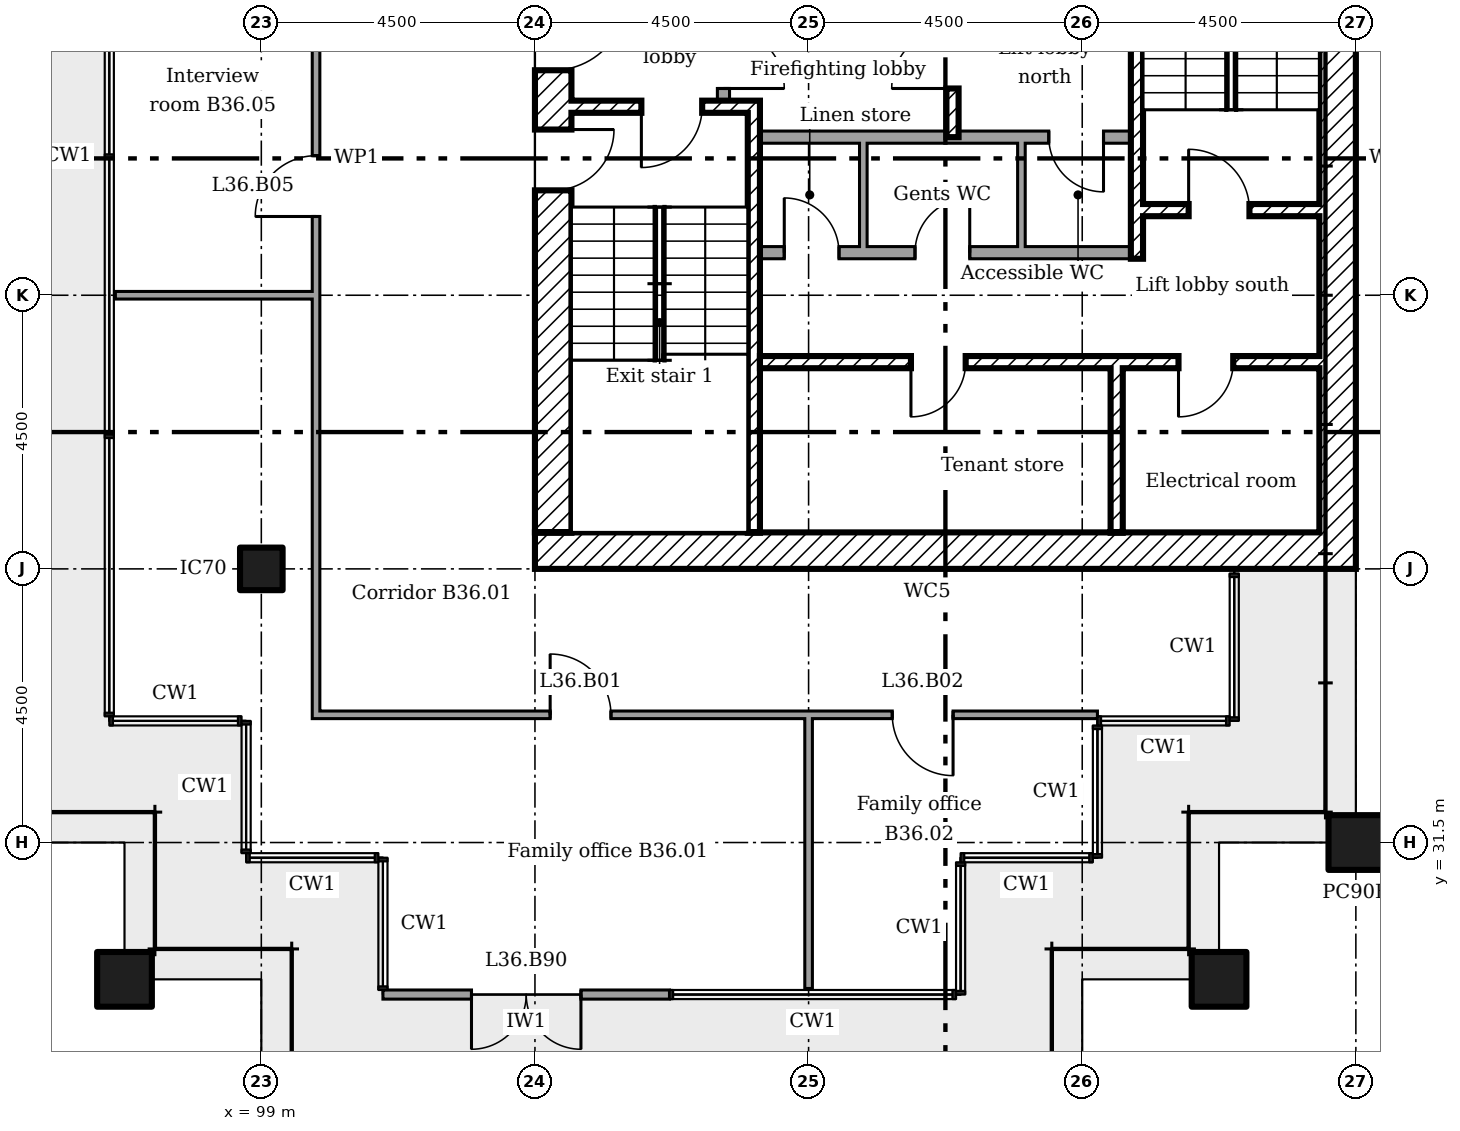
"""IFC4 building model, lengths in metres.
Left out: names, types, materials, properties, quantities, classifications, styles, units other than length and angle.
Written with IfcOpenShell. Run it as: python <this file> out.ifc"""

import sys

from ifc_helpers import new_model, si_unit, direction, frame, frame_2d, origin, origin_2d, place, context, subcontext, project, spatial, rectangle, extrude, element, fill, save


model = new_model("IFC4")
c1 = context("Model", 3, precision=1e-05, world=origin(), true_north=direction((0.0, 1.0)))
c2 = subcontext(c1, "Body", "Model", "MODEL_VIEW")
j1 = project(units=[si_unit("LENGTHUNIT", "METRE"), si_unit("PLANEANGLEUNIT", "RADIAN")], contexts=[c1])
p1 = place(None, origin())
s1 = spatial("IfcSite", under=j1, at=p1, CompositionType="ELEMENT")
p2 = place(p1, origin())
s2 = spatial("IfcBuilding", under=s1, at=p2, CompositionType="ELEMENT")
p3 = place(p2, frame((0.0, 0.0, 147.4)))
s3 = spatial("IfcBuildingStorey", under=s2, at=p3, CompositionType="ELEMENT", Elevation=147.4)
for number, where in (
    (1, (114.75, 29.25, 0.0)),
    (2, (117.0, 31.5, 0.0)),
    (3, (96.75, 29.25, 0.0)),
):
    element("IfcColumn", number, at=place(p3, frame(where)), inside=s3, PredefinedType="COLUMN", context=c2, shape_type="SweptSolid", body=[
        extrude(rectangle(XDim=0.9, YDim=0.9, at=origin_2d()), origin(), (0.0, 0.0, 1.0), 3.6),
    ])
p4 = place(p3, frame((99.0, 36.0, 0.0)))
e4 = element("IfcColumn", 4, at=p4, inside=s3, PredefinedType="COLUMN", context=c2, shape_type="SweptSolid", body=[
    extrude(rectangle(XDim=0.7, YDim=0.7, at=origin_2d()), origin(), (0.0, 0.0, 1.0), 3.6),
])
p5 = place(p3, frame((101.0, 29.0, 0.0)))
e5 = element("IfcWall", 5, at=p5, inside=s3, PredefinedType="SOLIDWALL", context=c2, shape_type="SweptSolid", body=[
    extrude(rectangle(XDim=4.712, YDim=0.15, at=frame_2d((2.356, 0.0))), origin(), (0.0, 0.0, 1.0), 3.45),
])
p6 = place(p5, frame((1.456, 0.0, 0.0)))
e6 = element("IfcOpeningElement", 6, at=p6, cuts=e5, PredefinedType="OPENING", context=c2, shape_type="SweptSolid", body=[
    extrude(rectangle(XDim=1.8, YDim=2.4, at=frame_2d((0.9, 1.2))), frame((0.0, 0.085, 0.0), z_axis=(0.0, -1.0, 0.0), x_axis=(1.0, 0.0, 0.0)), (0.0, 0.0, 1.0), 0.17),
])
p7 = place(p3, frame((116.7, 36.0, 0.0), z_axis=(0.0, 0.0, 1.0), x_axis=(0.0, 1.0, 0.0)))
e7 = element("IfcWall", 7, at=p7, inside=s3, PredefinedType="SHEAR", context=c2, shape_type="SweptSolid", body=[
    extrude(rectangle(XDim=13.5, YDim=0.6, at=frame_2d((6.75, 0.0))), origin(), (0.0, 0.0, 1.0), 3.35),
])
p8 = place(p3, frame((103.5, 36.3, 0.0)))
e8 = element("IfcWall", 8, at=p8, inside=s3, PredefinedType="SHEAR", context=c2, shape_type="SweptSolid", body=[
    extrude(rectangle(XDim=12.9, YDim=0.6, at=frame_2d((6.45, 0.0))), origin(), (0.0, 0.0, 1.0), 3.35),
])
p9 = place(p3, frame((103.8, 36.6, 0.0), z_axis=(0.0, 0.0, 1.0), x_axis=(0.0, 1.0, 0.0)))
e9 = element("IfcWall", 9, at=p9, inside=s3, PredefinedType="SHEAR", context=c2, shape_type="SweptSolid", body=[
    extrude(rectangle(XDim=12.3, YDim=0.6, at=frame_2d((6.15, 0.0))), origin(), (0.0, 0.0, 1.0), 3.35),
])
p10 = place(p9, frame((7.6, 0.0, 0.0)))
e10 = element("IfcOpeningElement", 10, at=p10, cuts=e9, PredefinedType="OPENING", context=c2, shape_type="SweptSolid", body=[
    extrude(rectangle(XDim=1.2, YDim=2.1, at=frame_2d((0.6, 1.05))), frame((0.0, 0.31, 0.0), z_axis=(0.0, -1.0, 0.0), x_axis=(1.0, 0.0, 0.0)), (0.0, 0.0, 1.0), 0.62),
])
p11 = place(p9, frame((5.625, 0.0, 0.0)))
e11 = element("IfcOpeningElement", 11, at=p11, cuts=e9, PredefinedType="OPENING", context=c2, shape_type="SweptSolid", body=[
    extrude(rectangle(XDim=1.0, YDim=2.1, at=frame_2d((0.5, 1.05))), frame((0.0, 0.31, 0.0), z_axis=(0.0, -1.0, 0.0), x_axis=(1.0, 0.0, 0.0)), (0.0, 0.0, 1.0), 0.62),
])
p12 = place(p3, frame((110.367, 48.9, 0.0), z_axis=(0.0, 0.0, 1.0), x_axis=(0.0, -1.0, 0.0)))
e12 = element("IfcWall", 12, at=p12, inside=s3, PredefinedType="SHEAR", context=c2, shape_type="SweptSolid", body=[
    extrude(rectangle(XDim=5.8, YDim=0.2, at=frame_2d((2.9, 0.0))), origin(), (0.0, 0.0, 1.0), 3.35),
])
p13 = place(p12, frame((4.0, 0.0, 0.0)))
e13 = element("IfcOpeningElement", 13, at=p13, cuts=e12, PredefinedType="OPENING", context=c2, shape_type="SweptSolid", body=[
    extrude(rectangle(XDim=1.0, YDim=2.1, at=frame_2d((0.5, 1.05))), frame((0.0, 0.11, 0.0), z_axis=(0.0, -1.0, 0.0), x_axis=(1.0, 0.0, 0.0)), (0.0, 0.0, 1.0), 0.22),
])
p14 = place(p3, frame((113.067, 36.6, 0.0), z_axis=(0.0, 0.0, 1.0), x_axis=(0.0, 1.0, 0.0)))
e14 = element("IfcWall", 14, at=p14, inside=s3, PredefinedType="SHEAR", context=c2, shape_type="SweptSolid", body=[
    extrude(rectangle(XDim=2.7, YDim=0.2, at=frame_2d((1.35, 0.0))), origin(), (0.0, 0.0, 1.0), 3.35),
])
p15 = place(p3, frame((106.6, 43.7, 0.0), z_axis=(0.0, 0.0, 1.0), x_axis=(0.0, 1.0, 0.0)))
e15 = element("IfcWall", 15, at=p15, inside=s3, PredefinedType="PARTITIONING", context=c2, shape_type="SweptSolid", body=[
    extrude(rectangle(XDim=1.5, YDim=0.2, at=frame_2d((0.75, 0.0))), origin(), (0.0, 0.0, 1.0), 3.35),
])
p16 = place(p15, frame((0.2, 0.0, 0.0)))
e16 = element("IfcOpeningElement", 16, at=p16, cuts=e15, PredefinedType="OPENING", context=c2, shape_type="SweptSolid", body=[
    extrude(rectangle(XDim=1.0, YDim=2.1, at=frame_2d((0.5, 1.05))), frame((0.0, 0.11, 0.0), z_axis=(0.0, -1.0, 0.0), x_axis=(1.0, 0.0, 0.0)), (0.0, 0.0, 1.0), 0.22),
])
p17 = place(p3, frame((107.2, 39.4, 0.0)))
e17 = element("IfcWall", 17, at=p17, inside=s3, PredefinedType="SHEAR", context=c2, shape_type="SweptSolid", body=[
    extrude(rectangle(XDim=9.2, YDim=0.2, at=frame_2d((4.6, 0.0))), origin(), (0.0, 0.0, 1.0), 3.35),
])
p18 = place(p17, frame((2.483, 0.0, 0.0)))
e18 = element("IfcOpeningElement", 18, at=p18, cuts=e17, PredefinedType="OPENING", context=c2, shape_type="SweptSolid", body=[
    extrude(rectangle(XDim=0.9, YDim=2.1, at=frame_2d((0.45, 1.05))), frame((0.0, 0.11, 0.0), z_axis=(0.0, -1.0, 0.0), x_axis=(1.0, 0.0, 0.0)), (0.0, 0.0, 1.0), 0.22),
])
p19 = place(p17, frame((6.883, 0.0, 0.0)))
e19 = element("IfcOpeningElement", 19, at=p19, cuts=e17, PredefinedType="OPENING", context=c2, shape_type="SweptSolid", body=[
    extrude(rectangle(XDim=0.9, YDim=2.1, at=frame_2d((0.45, 1.05))), frame((0.0, 0.11, 0.0), z_axis=(0.0, -1.0, 0.0), x_axis=(1.0, 0.0, 0.0)), (0.0, 0.0, 1.0), 0.22),
])
p20 = place(p3, frame((107.1, 36.6, 0.0), z_axis=(0.0, 0.0, 1.0), x_axis=(0.0, 1.0, 0.0)))
e20 = element("IfcWall", 20, at=p20, inside=s3, PredefinedType="SHEAR", context=c2, shape_type="SweptSolid", body=[
    extrude(rectangle(XDim=7.1, YDim=0.2, at=frame_2d((3.55, 0.0))), origin(), (0.0, 0.0, 1.0), 3.35),
])
p21 = place(p3, frame((104.1, 43.6, 0.0)))
e21 = element("IfcWall", 21, at=p21, inside=s3, PredefinedType="SHEAR", context=c2, shape_type="SweptSolid", body=[
    extrude(rectangle(XDim=2.9, YDim=0.2, at=frame_2d((1.45, 0.0))), origin(), (0.0, 0.0, 1.0), 3.35),
])
p22 = place(p21, frame((1.15, 0.0, 0.0)))
e22 = element("IfcOpeningElement", 22, at=p22, cuts=e21, PredefinedType="OPENING", context=c2, shape_type="SweptSolid", body=[
    extrude(rectangle(XDim=1.0, YDim=2.1, at=frame_2d((0.5, 1.05))), frame((0.0, 0.11, 0.0), z_axis=(0.0, -1.0, 0.0), x_axis=(1.0, 0.0, 0.0)), (0.0, 0.0, 1.0), 0.22),
])
p23 = place(p3, frame((113.5, 41.9, 0.0)))
e23 = element("IfcWall", 23, at=p23, inside=s3, PredefinedType="SHEAR", context=c2, shape_type="SweptSolid", body=[
    extrude(rectangle(XDim=2.9, YDim=0.2, at=frame_2d((1.45, 0.0))), origin(), (0.0, 0.0, 1.0), 3.35),
])
p24 = place(p23, frame((0.75, 0.0, 0.0)))
e24 = element("IfcOpeningElement", 24, at=p24, cuts=e23, PredefinedType="OPENING", context=c2, shape_type="SweptSolid", body=[
    extrude(rectangle(XDim=1.0, YDim=2.1, at=frame_2d((0.5, 1.05))), frame((0.0, 0.11, 0.0), z_axis=(0.0, -1.0, 0.0), x_axis=(1.0, 0.0, 0.0)), (0.0, 0.0, 1.0), 0.22),
])
p25 = place(p3, frame((113.4, 41.1, 0.0), z_axis=(0.0, 0.0, 1.0), x_axis=(0.0, 1.0, 0.0)))
e25 = element("IfcWall", 25, at=p25, inside=s3, PredefinedType="SHEAR", context=c2, shape_type="SweptSolid", body=[
    extrude(rectangle(XDim=7.8, YDim=0.2, at=frame_2d((3.9, 0.0))), origin(), (0.0, 0.0, 1.0), 3.35),
])
p26 = place(p3, frame((107.2, 43.1, 0.0)))
e26 = element("IfcWall", 26, at=p26, inside=s3, PredefinedType="PARTITIONING", context=c2, shape_type="SweptSolid", body=[
    extrude(rectangle(XDim=6.1, YDim=0.2, at=frame_2d((3.05, 0.0))), origin(), (0.0, 0.0, 1.0), 3.35),
])
p27 = place(p26, frame((4.75, 0.0, 0.0)))
e27 = element("IfcOpeningElement", 27, at=p27, cuts=e26, PredefinedType="OPENING", context=c2, shape_type="SweptSolid", body=[
    extrude(rectangle(XDim=0.9, YDim=2.1, at=frame_2d((0.45, 1.05))), frame((0.0, 0.11, 0.0), z_axis=(0.0, -1.0, 0.0), x_axis=(1.0, 0.0, 0.0)), (0.0, 0.0, 1.0), 0.22),
])
p28 = place(p3, frame((107.2, 41.2, 0.0)))
e28 = element("IfcWall", 28, at=p28, inside=s3, PredefinedType="PARTITIONING", context=c2, shape_type="SweptSolid", body=[
    extrude(rectangle(XDim=6.1, YDim=0.2, at=frame_2d((3.05, 0.0))), origin(), (0.0, 0.0, 1.0), 3.35),
])
p29 = place(p28, frame((0.4, 0.0, 0.0)))
e29 = element("IfcOpeningElement", 29, at=p29, cuts=e28, PredefinedType="OPENING", context=c2, shape_type="SweptSolid", body=[
    extrude(rectangle(XDim=0.9, YDim=2.1, at=frame_2d((0.45, 1.05))), frame((0.0, 0.11, 0.0), z_axis=(0.0, -1.0, 0.0), x_axis=(1.0, 0.0, 0.0)), (0.0, 0.0, 1.0), 0.22),
])
p30 = place(p28, frame((2.55, 0.0, 0.0)))
e30 = element("IfcOpeningElement", 30, at=p30, cuts=e28, PredefinedType="OPENING", context=c2, shape_type="SweptSolid", body=[
    extrude(rectangle(XDim=0.9, YDim=2.1, at=frame_2d((0.45, 1.05))), frame((0.0, 0.11, 0.0), z_axis=(0.0, -1.0, 0.0), x_axis=(1.0, 0.0, 0.0)), (0.0, 0.0, 1.0), 0.22),
])
for number, where, z_axis, x_axis in (
    (31, (108.9, 41.3, 0.0), (0.0, 0.0, 1.0), (0.0, 1.0, 0.0)),
    (32, (111.5, 41.3, 0.0), (0.0, 0.0, 1.0), (0.0, 1.0, 0.0)),
):
    element("IfcWall", number, at=place(p3, frame(where, z_axis=z_axis, x_axis=x_axis)), inside=s3, PredefinedType="PARTITIONING", context=c2, shape_type="SweptSolid", body=[
        extrude(rectangle(XDim=1.7, YDim=0.125, at=frame_2d((0.85, 0.0))), origin(), (0.0, 0.0, 1.0), 3.35),
    ])
p31 = place(p3, frame((99.837, 33.6, 0.0)))
e33 = element("IfcWall", 33, at=p31, inside=s3, PredefinedType="PARTITIONING", context=c2, shape_type="SweptSolid", body=[
    extrude(rectangle(XDim=12.913, YDim=0.125, at=frame_2d((6.456, 0.0))), origin(), (0.0, 0.0, 1.0), 3.45),
])
p32 = place(p31, frame((3.913, 0.0, 0.0)))
e34 = element("IfcOpeningElement", 34, at=p32, cuts=e33, PredefinedType="OPENING", context=c2, shape_type="SweptSolid", body=[
    extrude(rectangle(XDim=1.0, YDim=2.1, at=frame_2d((0.5, 1.05))), frame((0.0, 0.073, 0.0), z_axis=(0.0, -1.0, 0.0), x_axis=(1.0, 0.0, 0.0)), (0.0, 0.0, 1.0), 0.145),
])
p33 = place(p31, frame((9.539, 0.0, 0.0)))
e35 = element("IfcOpeningElement", 35, at=p33, cuts=e33, PredefinedType="OPENING", context=c2, shape_type="SweptSolid", body=[
    extrude(rectangle(XDim=1.0, YDim=2.1, at=frame_2d((0.5, 1.05))), frame((0.0, 0.073, 0.0), z_axis=(0.0, -1.0, 0.0), x_axis=(1.0, 0.0, 0.0)), (0.0, 0.0, 1.0), 0.145),
])
p34 = place(p3, frame((96.6, 40.5, 0.0)))
e36 = element("IfcWall", 36, at=p34, inside=s3, PredefinedType="PARTITIONING", context=c2, shape_type="SweptSolid", body=[
    extrude(rectangle(XDim=3.3, YDim=0.125, at=frame_2d((1.65, 0.0))), origin(), (0.0, 0.0, 1.0), 2.851),
])
p35 = place(p3, frame((99.9, 33.663, 0.0), z_axis=(0.0, 0.0, 1.0), x_axis=(0.0, 1.0, 0.0)))
e37 = element("IfcWall", 37, at=p35, inside=s3, PredefinedType="PARTITIONING", context=c2, shape_type="SweptSolid", body=[
    extrude(rectangle(XDim=18.175, YDim=0.125, at=frame_2d((9.087, 0.0))), origin(), (0.0, 0.0, 1.0), 3.45),
])
p36 = place(p35, frame((16.625, 0.0, 0.0)))
e38 = element("IfcOpeningElement", 38, at=p36, cuts=e37, PredefinedType="OPENING", context=c2, shape_type="SweptSolid", body=[
    extrude(rectangle(XDim=1.0, YDim=2.1, at=frame_2d((0.5, 1.05))), frame((0.0, 0.073, 0.0), z_axis=(0.0, -1.0, 0.0), x_axis=(1.0, 0.0, 0.0)), (0.0, 0.0, 1.0), 0.145),
])
p37 = place(p35, frame((13.087, 0.0, 0.0)))
e39 = element("IfcOpeningElement", 39, at=p37, cuts=e37, PredefinedType="OPENING", context=c2, shape_type="SweptSolid", body=[
    extrude(rectangle(XDim=1.0, YDim=2.1, at=frame_2d((0.5, 1.05))), frame((0.0, 0.073, 0.0), z_axis=(0.0, -1.0, 0.0), x_axis=(1.0, 0.0, 0.0)), (0.0, 0.0, 1.0), 0.145),
])
p38 = place(p35, frame((8.133, 0.0, 0.0)))
e40 = element("IfcOpeningElement", 40, at=p38, cuts=e37, PredefinedType="OPENING", context=c2, shape_type="SweptSolid", body=[
    extrude(rectangle(XDim=1.0, YDim=2.1, at=frame_2d((0.5, 1.05))), frame((0.0, 0.073, 0.0), z_axis=(0.0, -1.0, 0.0), x_axis=(1.0, 0.0, 0.0)), (0.0, 0.0, 1.0), 0.145),
])
p39 = place(p3, frame((108.0, 29.1, 0.0), z_axis=(0.0, 0.0, 1.0), x_axis=(0.0, 1.0, 0.0)))
e41 = element("IfcWall", 41, at=p39, inside=s3, PredefinedType="PARTITIONING", context=c2, shape_type="SweptSolid", body=[
    extrude(rectangle(XDim=4.5, YDim=0.125, at=frame_2d((2.25, 0.0))), origin(), (0.0, 0.0, 1.0), 2.851),
])
p40 = place(p6, frame((1.8, 0.0, 0.0), x_axis=(-1.0, 0.0, 0.0)))
e42 = element("IfcDoor", 42, at=p40, inside=s3, OperationType="DOUBLE_DOOR_DOUBLE_SWING", PredefinedType="NOTDEFINED", context=c2, shape_type="SweptSolid", body=[
    extrude(rectangle(XDim=1.8, YDim=2.4, at=frame_2d((0.9, 1.2))), frame((0.0, 0.025, 0.0), z_axis=(0.0, -1.0, 0.0), x_axis=(1.0, 0.0, 0.0)), (0.0, 0.0, 1.0), 0.05),
])
fill(e6, e42)
p41 = place(p10, frame((1.2, 0.0, 0.0), x_axis=(-1.0, 0.0, 0.0)))
e43 = element("IfcDoor", 43, at=p41, inside=s3, OperationType="SINGLE_SWING_RIGHT", PredefinedType="DOOR", context=c2, shape_type="SweptSolid", body=[
    extrude(rectangle(XDim=1.2, YDim=2.1, at=frame_2d((0.6, 1.05))), frame((0.0, 0.025, 0.0), z_axis=(0.0, -1.0, 0.0), x_axis=(1.0, 0.0, 0.0)), (0.0, 0.0, 1.0), 0.05),
])
fill(e10, e43)
p42 = place(p22, frame((1.0, 0.0, 0.0), x_axis=(-1.0, 0.0, 0.0)))
e44 = element("IfcDoor", 44, at=p42, inside=s3, OperationType="SINGLE_SWING_LEFT", PredefinedType="DOOR", context=c2, shape_type="SweptSolid", body=[
    extrude(rectangle(XDim=1.0, YDim=2.1, at=frame_2d((0.5, 1.05))), frame((0.0, 0.025, 0.0), z_axis=(0.0, -1.0, 0.0), x_axis=(1.0, 0.0, 0.0)), (0.0, 0.0, 1.0), 0.05),
])
fill(e22, e44)
p43 = place(p11, frame((1.0, 0.0, 0.0), x_axis=(-1.0, 0.0, 0.0)))
e45 = element("IfcDoor", 45, at=p43, inside=s3, OperationType="SINGLE_SWING_RIGHT", PredefinedType="DOOR", context=c2, shape_type="SweptSolid", body=[
    extrude(rectangle(XDim=1.0, YDim=2.1, at=frame_2d((0.5, 1.05))), frame((0.0, 0.025, 0.0), z_axis=(0.0, -1.0, 0.0), x_axis=(1.0, 0.0, 0.0)), (0.0, 0.0, 1.0), 0.05),
])
fill(e11, e45)
p44 = place(p24, origin())
e46 = element("IfcDoor", 46, at=p44, inside=s3, OperationType="SINGLE_SWING_RIGHT", PredefinedType="DOOR", context=c2, shape_type="SweptSolid", body=[
    extrude(rectangle(XDim=1.0, YDim=2.1, at=frame_2d((0.5, 1.05))), frame((0.0, 0.025, 0.0), z_axis=(0.0, -1.0, 0.0), x_axis=(1.0, 0.0, 0.0)), (0.0, 0.0, 1.0), 0.05),
])
fill(e24, e46)
p45 = place(p13, frame((1.0, 0.0, 0.0), x_axis=(-1.0, 0.0, 0.0)))
e47 = element("IfcDoor", 47, at=p45, inside=s3, OperationType="SINGLE_SWING_RIGHT", PredefinedType="DOOR", context=c2, shape_type="SweptSolid", body=[
    extrude(rectangle(XDim=1.0, YDim=2.1, at=frame_2d((0.5, 1.05))), frame((0.0, 0.025, 0.0), z_axis=(0.0, -1.0, 0.0), x_axis=(1.0, 0.0, 0.0)), (0.0, 0.0, 1.0), 0.05),
])
fill(e13, e47)
p46 = place(p16, frame((1.0, 0.0, 0.0), x_axis=(-1.0, 0.0, 0.0)))
e48 = element("IfcDoor", 48, at=p46, inside=s3, OperationType="SINGLE_SWING_LEFT", PredefinedType="DOOR", context=c2, shape_type="SweptSolid", body=[
    extrude(rectangle(XDim=1.0, YDim=2.1, at=frame_2d((0.5, 1.05))), frame((0.0, 0.025, 0.0), z_axis=(0.0, -1.0, 0.0), x_axis=(1.0, 0.0, 0.0)), (0.0, 0.0, 1.0), 0.05),
])
fill(e16, e48)
p47 = place(p18, frame((0.9, 0.0, 0.0), x_axis=(-1.0, 0.0, 0.0)))
e49 = element("IfcDoor", 49, at=p47, inside=s3, OperationType="SINGLE_SWING_LEFT", PredefinedType="DOOR", context=c2, shape_type="SweptSolid", body=[
    extrude(rectangle(XDim=0.9, YDim=2.1, at=frame_2d((0.45, 1.05))), frame((0.0, 0.025, 0.0), z_axis=(0.0, -1.0, 0.0), x_axis=(1.0, 0.0, 0.0)), (0.0, 0.0, 1.0), 0.05),
])
fill(e18, e49)
p48 = place(p19, frame((0.9, 0.0, 0.0), x_axis=(-1.0, 0.0, 0.0)))
e50 = element("IfcDoor", 50, at=p48, inside=s3, OperationType="SINGLE_SWING_LEFT", PredefinedType="DOOR", context=c2, shape_type="SweptSolid", body=[
    extrude(rectangle(XDim=0.9, YDim=2.1, at=frame_2d((0.45, 1.05))), frame((0.0, 0.025, 0.0), z_axis=(0.0, -1.0, 0.0), x_axis=(1.0, 0.0, 0.0)), (0.0, 0.0, 1.0), 0.05),
])
fill(e19, e50)
p49 = place(p29, origin())
e51 = element("IfcDoor", 51, at=p49, inside=s3, OperationType="SINGLE_SWING_RIGHT", PredefinedType="DOOR", context=c2, shape_type="SweptSolid", body=[
    extrude(rectangle(XDim=0.9, YDim=2.1, at=frame_2d((0.45, 1.05))), frame((0.0, 0.025, 0.0), z_axis=(0.0, -1.0, 0.0), x_axis=(1.0, 0.0, 0.0)), (0.0, 0.0, 1.0), 0.05),
])
fill(e29, e51)
p50 = place(p30, origin())
e52 = element("IfcDoor", 52, at=p50, inside=s3, OperationType="SINGLE_SWING_LEFT", PredefinedType="DOOR", context=c2, shape_type="SweptSolid", body=[
    extrude(rectangle(XDim=0.9, YDim=2.1, at=frame_2d((0.45, 1.05))), frame((0.0, 0.025, 0.0), z_axis=(0.0, -1.0, 0.0), x_axis=(1.0, 0.0, 0.0)), (0.0, 0.0, 1.0), 0.05),
])
fill(e30, e52)
p51 = place(p27, frame((0.9, 0.0, 0.0), x_axis=(-1.0, 0.0, 0.0)))
e53 = element("IfcDoor", 53, at=p51, inside=s3, OperationType="SINGLE_SWING_RIGHT", PredefinedType="DOOR", context=c2, shape_type="SweptSolid", body=[
    extrude(rectangle(XDim=0.9, YDim=2.1, at=frame_2d((0.45, 1.05))), frame((0.0, 0.025, 0.0), z_axis=(0.0, -1.0, 0.0), x_axis=(1.0, 0.0, 0.0)), (0.0, 0.0, 1.0), 0.05),
])
fill(e27, e53)
p52 = place(p32, origin())
e54 = element("IfcDoor", 54, at=p52, inside=s3, OperationType="SINGLE_SWING_RIGHT", PredefinedType="DOOR", context=c2, shape_type="SweptSolid", body=[
    extrude(rectangle(XDim=1.0, YDim=2.1, at=frame_2d((0.5, 1.05))), frame((0.0, 0.025, 0.0), z_axis=(0.0, -1.0, 0.0), x_axis=(1.0, 0.0, 0.0)), (0.0, 0.0, 1.0), 0.05),
])
fill(e34, e54)
p53 = place(p33, frame((1.0, 0.0, 0.0), x_axis=(-1.0, 0.0, 0.0)))
e55 = element("IfcDoor", 55, at=p53, inside=s3, OperationType="SINGLE_SWING_RIGHT", PredefinedType="DOOR", context=c2, shape_type="SweptSolid", body=[
    extrude(rectangle(XDim=1.0, YDim=2.1, at=frame_2d((0.5, 1.05))), frame((0.0, 0.025, 0.0), z_axis=(0.0, -1.0, 0.0), x_axis=(1.0, 0.0, 0.0)), (0.0, 0.0, 1.0), 0.05),
])
fill(e35, e55)
p54 = place(p38, origin())
e56 = element("IfcDoor", 56, at=p54, inside=s3, OperationType="SINGLE_SWING_RIGHT", PredefinedType="DOOR", context=c2, shape_type="SweptSolid", body=[
    extrude(rectangle(XDim=1.0, YDim=2.1, at=frame_2d((0.5, 1.05))), frame((0.0, 0.025, 0.0), z_axis=(0.0, -1.0, 0.0), x_axis=(1.0, 0.0, 0.0)), (0.0, 0.0, 1.0), 0.05),
])
fill(e40, e56)
save(model, sys.argv[1])
